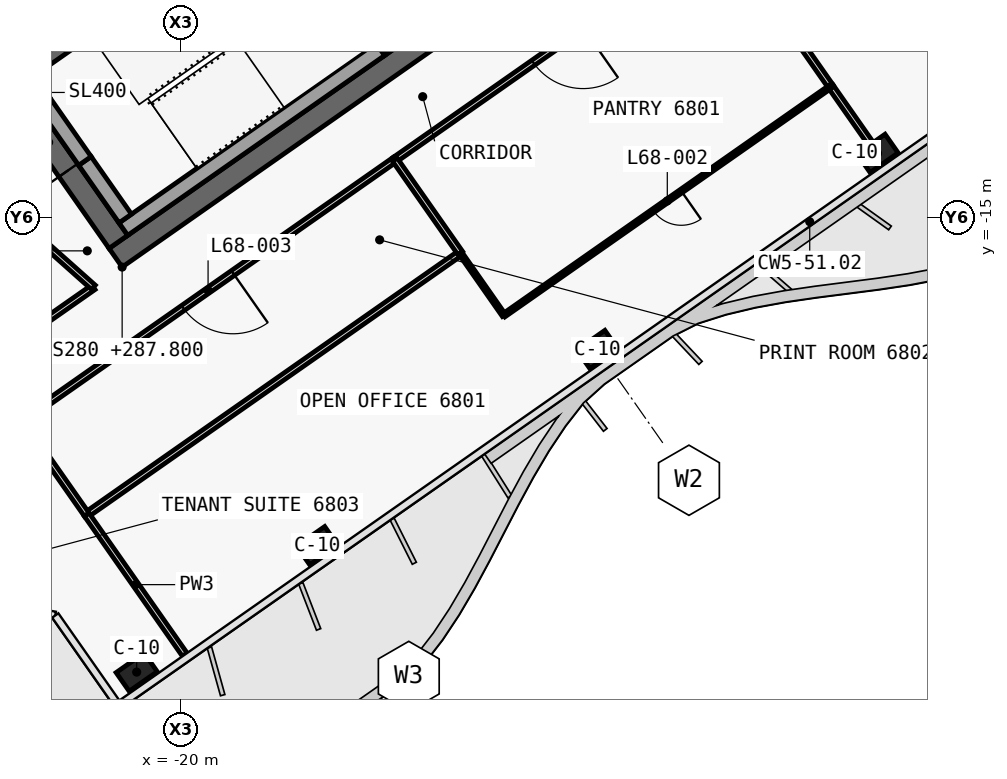
"""IFC4 building model, lengths in metres.
Left out: names, types, materials, properties, quantities, classifications, styles, units other than length and angle.
Written with IfcOpenShell. Run it as: python <this file> out.ifc"""

import sys

from ifc_helpers import new_model, si_unit, direction, frame, frame_2d, origin, origin_2d, place, context, subcontext, project, spatial, polyline, rectangle, outline, extrude, element, fill, save


model = new_model("IFC4")
c1 = context("Model", 3, precision=1e-05, world=origin(), true_north=direction((0.0, 1.0)))
c2 = subcontext(c1, "Body", "Model", "MODEL_VIEW")
j1 = project(units=[si_unit("LENGTHUNIT", "METRE"), si_unit("PLANEANGLEUNIT", "RADIAN")], contexts=[c1])
p1 = place(None, origin())
s1 = spatial("IfcSite", under=j1, at=p1, CompositionType="ELEMENT")
p2 = place(p1, origin())
s2 = spatial("IfcBuilding", under=s1, at=p2, CompositionType="ELEMENT")
p3 = place(p2, frame((0.0, 0.0, 287.8)))
s3 = spatial("IfcBuildingStorey", under=s2, at=p3, CompositionType="ELEMENT", Elevation=287.8)
p4 = place(p3, frame((-0.028, -0.874, 0.0), z_axis=(0.0, 0.0, 1.0), x_axis=(-0.819150035022, -0.573579305871, 0.0)))
e1 = element("IfcWall", 1, at=p4, inside=s3, PredefinedType="SHEAR", context=c2, shape_type="SweptSolid", body=[
    extrude(outline(polyline([(26.476, 0.3), (0.42, 0.3), (0.0, -0.3), (26.476, -0.3), (26.476, 0.3)])), origin(), (0.0, 0.0, 1.0), 3.9),
])
p5 = place(p4, frame((2.976, 0.0, 0.0)))
e2 = element("IfcOpeningElement", 2, at=p5, cuts=e1, PredefinedType="OPENING", context=c2, shape_type="SweptSolid", body=[
    extrude(rectangle(XDim=2.4, YDim=2.1, at=frame_2d((1.2, 1.05))), frame((0.0, 0.31, 0.0), z_axis=(0.0, -1.0, 0.0), x_axis=(1.0, 0.0, 0.0)), (0.0, 0.0, 1.0), 0.62),
])
p6 = place(p4, frame((11.776, 0.0, 0.0)))
e3 = element("IfcOpeningElement", 3, at=p6, cuts=e1, PredefinedType="OPENING", context=c2, shape_type="SweptSolid", body=[
    extrude(rectangle(XDim=2.4, YDim=2.1, at=frame_2d((1.2, 1.05))), frame((0.0, 0.31, 0.0), z_axis=(0.0, -1.0, 0.0), x_axis=(1.0, 0.0, 0.0)), (0.0, 0.0, 1.0), 0.62),
])
p7 = place(p3, frame((-21.642, -15.642, 0.0), z_axis=(0.0, 0.0, 1.0), x_axis=(-0.573586866468, 0.819144740944, 0.0)))
e4 = element("IfcWall", 4, at=p7, inside=s3, PredefinedType="SHEAR", context=c2, shape_type="SweptSolid", body=[
    extrude(outline(polyline([(0.0, 0.3), (0.0, -0.3), (10.0, -0.3), (10.0, 0.3), (0.0, 0.3)])), origin(), (0.0, 0.0, 1.0), 3.9),
])
p8 = place(p7, frame((6.5, 0.0, 0.0)))
e5 = element("IfcOpeningElement", 5, at=p8, cuts=e4, PredefinedType="OPENING", context=c2, shape_type="SweptSolid", body=[
    extrude(rectangle(XDim=1.8, YDim=2.1, at=frame_2d((0.9, 1.05))), frame((0.0, 0.31, 0.0), z_axis=(0.0, -1.0, 0.0), x_axis=(1.0, 0.0, 0.0)), (0.0, 0.0, 1.0), 0.62),
])
p9 = place(p7, frame((2.3, 0.0, 0.0)))
e6 = element("IfcOpeningElement", 6, at=p9, cuts=e4, PredefinedType="OPENING", context=c2, shape_type="SweptSolid", body=[
    extrude(rectangle(XDim=1.8, YDim=2.1, at=frame_2d((0.9, 1.05))), frame((0.0, 0.31, 0.0), z_axis=(0.0, -1.0, 0.0), x_axis=(1.0, 0.0, 0.0)), (0.0, 0.0, 1.0), 0.62),
])
p10 = place(p3, frame((-14.515, -10.652, 0.0), z_axis=(0.0, 0.0, 1.0), x_axis=(-0.573560315113, 0.819163332265, 0.0)))
e7 = element("IfcWall", 7, at=p10, inside=s3, PredefinedType="SHEAR", context=c2, shape_type="SweptSolid", body=[
    extrude(outline(polyline([(4.85, 0.15), (0.0, 0.15), (0.0, -0.15), (4.85, -0.15), (4.85, 0.15)])), origin(), (0.0, 0.0, 1.0), 3.9),
])
p11 = place(p3, frame((-2.638, 3.768, 0.0), z_axis=(0.0, 0.0, 1.0), x_axis=(-0.819155014212, -0.573572194837, 0.0)))
e8 = element("IfcWall", 8, at=p11, inside=s3, PredefinedType="SHEAR", context=c2, shape_type="SweptSolid", body=[
    extrude(outline(polyline([(26.4, 0.15), (0.0, 0.15), (0.0, -0.15), (26.4, -0.15), (26.4, 0.15)])), origin(), (0.0, 0.0, 1.0), 3.9),
])
p12 = place(p11, frame((1.169, 0.0, 0.0)))
e9 = element("IfcOpeningElement", 9, at=p12, cuts=e8, PredefinedType="OPENING", context=c2, shape_type="SweptSolid", body=[
    extrude(rectangle(XDim=1.1, YDim=2.1, at=frame_2d((0.55, 1.05))), frame((0.0, 0.16, 0.0), z_axis=(0.0, -1.0, 0.0), x_axis=(1.0, 0.0, 0.0)), (0.0, 0.0, 1.0), 0.32),
])
p13 = place(p11, frame((3.206, 0.0, 0.0)))
e10 = element("IfcOpeningElement", 10, at=p13, cuts=e8, PredefinedType="OPENING", context=c2, shape_type="SweptSolid", body=[
    extrude(rectangle(XDim=1.1, YDim=2.1, at=frame_2d((0.55, 1.05))), frame((0.0, 0.16, 0.0), z_axis=(0.0, -1.0, 0.0), x_axis=(1.0, 0.0, 0.0)), (0.0, 0.0, 1.0), 0.32),
])
p14 = place(p11, frame((5.244, 0.0, 0.0)))
e11 = element("IfcOpeningElement", 11, at=p14, cuts=e8, PredefinedType="OPENING", context=c2, shape_type="SweptSolid", body=[
    extrude(rectangle(XDim=1.1, YDim=2.1, at=frame_2d((0.55, 1.05))), frame((0.0, 0.16, 0.0), z_axis=(0.0, -1.0, 0.0), x_axis=(1.0, 0.0, 0.0)), (0.0, 0.0, 1.0), 0.32),
])
p15 = place(p11, frame((7.281, 0.0, 0.0)))
e12 = element("IfcOpeningElement", 12, at=p15, cuts=e8, PredefinedType="OPENING", context=c2, shape_type="SweptSolid", body=[
    extrude(rectangle(XDim=1.1, YDim=2.1, at=frame_2d((0.55, 1.05))), frame((0.0, 0.16, 0.0), z_axis=(0.0, -1.0, 0.0), x_axis=(1.0, 0.0, 0.0)), (0.0, 0.0, 1.0), 0.32),
])
p16 = place(p11, frame((9.688, 0.0, 0.0)))
e13 = element("IfcOpeningElement", 13, at=p16, cuts=e8, PredefinedType="OPENING", context=c2, shape_type="SweptSolid", body=[
    extrude(rectangle(XDim=1.1, YDim=2.1, at=frame_2d((0.55, 1.05))), frame((0.0, 0.16, 0.0), z_axis=(0.0, -1.0, 0.0), x_axis=(1.0, 0.0, 0.0)), (0.0, 0.0, 1.0), 0.32),
])
p17 = place(p11, frame((11.863, 0.0, 0.0)))
e14 = element("IfcOpeningElement", 14, at=p17, cuts=e8, PredefinedType="OPENING", context=c2, shape_type="SweptSolid", body=[
    extrude(rectangle(XDim=1.1, YDim=2.1, at=frame_2d((0.55, 1.05))), frame((0.0, 0.16, 0.0), z_axis=(0.0, -1.0, 0.0), x_axis=(1.0, 0.0, 0.0)), (0.0, 0.0, 1.0), 0.32),
])
p18 = place(p11, frame((13.722, 0.0, 0.0)))
e15 = element("IfcOpeningElement", 15, at=p18, cuts=e8, PredefinedType="OPENING", context=c2, shape_type="SweptSolid", body=[
    extrude(rectangle(XDim=1.0, YDim=2.1, at=frame_2d((0.5, 1.05))), frame((0.0, 0.16, 0.0), z_axis=(0.0, -1.0, 0.0), x_axis=(1.0, 0.0, 0.0)), (0.0, 0.0, 1.0), 0.32),
])
p19 = place(p11, frame((15.798, 0.0, 0.0)))
e16 = element("IfcOpeningElement", 16, at=p19, cuts=e8, PredefinedType="OPENING", context=c2, shape_type="SweptSolid", body=[
    extrude(rectangle(XDim=1.0, YDim=2.1, at=frame_2d((0.5, 1.05))), frame((0.0, 0.16, 0.0), z_axis=(0.0, -1.0, 0.0), x_axis=(1.0, 0.0, 0.0)), (0.0, 0.0, 1.0), 0.32),
])
for number, where, z_axis, x_axis in (
    (17, (-1.665, -13.313, 0.0), (0.0, 0.0, 1.0), (-0.819, -0.574, 0.0)),
    (18, (-9.038, -18.475, 0.0), (0.0, 0.0, 1.0), (-0.819, -0.574, 0.0)),
    (19, (-16.41, -23.637, 0.0), (0.0, 0.0, 1.0), (-0.819, -0.574, 0.0)),
    (20, (-21.161, -26.964, 0.0), (0.0, 0.0, 1.0), (-0.819, -0.574, 0.0)),
):
    element("IfcColumn", number, at=place(p3, frame(where, z_axis=z_axis, x_axis=x_axis)), inside=s3, PredefinedType="COLUMN", context=c2, shape_type="SweptSolid", body=[
        extrude(rectangle(XDim=0.9, YDim=0.6, at=origin_2d()), origin(), (0.0, 0.0, 1.0), 3.9),
    ])
p20 = place(p3, frame((-14.753, -10.574, 0.0), z_axis=(0.0, 0.0, 1.0), x_axis=(-0.819158229677, -0.573567602601, 0.0)))
e21 = element("IfcWall", 21, at=p20, inside=s3, PredefinedType="SOLIDWALL", context=c2, shape_type="SweptSolid", body=[
    extrude(rectangle(XDim=8.25, YDim=0.4, at=frame_2d((4.125, 0.0))), origin(), (0.0, 0.0, 1.0), 3.62),
])
p21 = place(p3, frame((-21.462, -15.028, 0.0), z_axis=(0.0, 0.0, 1.0), x_axis=(-0.573559770908, 0.819163713305, 0.0)))
e22 = element("IfcWall", 22, at=p21, inside=s3, PredefinedType="SOLIDWALL", context=c2, shape_type="SweptSolid", body=[
    extrude(rectangle(XDim=1.85, YDim=0.4, at=frame_2d((0.925, 0.0))), origin(), (0.0, 0.0, 1.0), 3.62),
])
p22 = place(p3, frame((-22.523, -13.512, 2.15), z_axis=(0.0, 0.0, 1.0), x_axis=(-0.573591692345, 0.819141361715, 0.0)))
e23 = element("IfcWall", 23, at=p22, inside=s3, PredefinedType="SOLIDWALL", context=c2, shape_type="SweptSolid", body=[
    extrude(rectangle(XDim=1.9, YDim=0.4, at=frame_2d((0.95, 0.0))), origin(), (0.0, 0.0, 1.0), 1.47),
])
p23 = place(p3, frame((-26.459, -19.749, 0.0), z_axis=(0.0, 0.0, 1.0), x_axis=(0.819141574295, 0.573591388761, 0.0)))
e24 = element("IfcWall", 24, at=p23, inside=s3, PredefinedType="PARTITIONING", context=c2, shape_type="SweptSolid", body=[
    extrude(rectangle(XDim=5.079, YDim=0.15, at=frame_2d((2.539, 0.0))), origin(), (0.0, 0.0, 1.0), 3.05),
])
p24 = place(p23, frame((1.74, 0.0, 0.0)))
e25 = element("IfcOpeningElement", 25, at=p24, cuts=e24, PredefinedType="OPENING", context=c2, shape_type="SweptSolid", body=[
    extrude(rectangle(XDim=1.6, YDim=2.1, at=frame_2d((0.8, 1.05))), frame((0.0, 0.085, 0.0), z_axis=(0.0, -1.0, 0.0), x_axis=(1.0, 0.0, 0.0)), (0.0, 0.0, 1.0), 0.17),
])
p25 = place(p3, frame((-5.766, -7.456, 0.0), z_axis=(0.0, 0.0, 1.0), x_axis=(-0.819154371039, -0.573573113393, 0.0)))
e26 = element("IfcWall", 26, at=p25, inside=s3, PredefinedType="PARTITIONING", context=c2, shape_type="SweptSolid", body=[
    extrude(rectangle(XDim=10.502, YDim=0.15, at=frame_2d((5.251, 0.0))), origin(), (0.0, 0.0, 1.0), 3.05),
])
p26 = place(p25, frame((4.451, 0.0, 0.0)))
e27 = element("IfcOpeningElement", 27, at=p26, cuts=e26, PredefinedType="OPENING", context=c2, shape_type="SweptSolid", body=[
    extrude(rectangle(XDim=1.6, YDim=2.1, at=frame_2d((0.8, 1.05))), frame((0.0, 0.085, 0.0), z_axis=(0.0, -1.0, 0.0), x_axis=(1.0, 0.0, 0.0)), (0.0, 0.0, 1.0), 0.17),
])
p27 = place(p3, frame((-14.366, -13.477, 0.0), z_axis=(0.0, 0.0, 1.0), x_axis=(-0.819164075089, -0.573559254204, 0.0)))
e28 = element("IfcWall", 28, at=p27, inside=s3, PredefinedType="PARTITIONING", context=c2, shape_type="SweptSolid", body=[
    extrude(rectangle(XDim=12.004, YDim=0.15, at=frame_2d((6.002, 0.0))), origin(), (0.0, 0.0, 1.0), 3.05),
])
p28 = place(p27, frame((5.202, 0.0, 0.0)))
e29 = element("IfcOpeningElement", 29, at=p28, cuts=e28, PredefinedType="OPENING", context=c2, shape_type="SweptSolid", body=[
    extrude(rectangle(XDim=1.6, YDim=2.1, at=frame_2d((0.8, 1.05))), frame((0.0, 0.085, 0.0), z_axis=(0.0, -1.0, 0.0), x_axis=(1.0, 0.0, 0.0)), (0.0, 0.0, 1.0), 0.17),
])
p29 = place(p3, frame((-1.849, -13.051, 0.0), z_axis=(0.0, 0.0, 1.0), x_axis=(-0.573542889209, 0.819175533227, 0.0)))
e30 = element("IfcWall", 30, at=p29, inside=s3, PredefinedType="PARTITIONING", context=c2, shape_type="SweptSolid", body=[
    extrude(rectangle(XDim=1.831, YDim=0.15, at=frame_2d((0.916, 0.0))), origin(), (0.0, 0.0, 1.0), 3.05),
])
p30 = place(p3, frame((-2.897, -11.553, 0.0), z_axis=(0.0, 0.0, 1.0), x_axis=(-0.573593309886, 0.819140229054, 0.0)))
e31 = element("IfcWall", 31, at=p30, inside=s3, PredefinedType="PARTITIONING", context=c2, shape_type="SweptSolid", body=[
    extrude(rectangle(XDim=5.004, YDim=0.15, at=frame_2d((2.502, 0.0))), origin(), (0.0, 0.0, 1.0), 3.05),
])
p31 = place(p3, frame((-22.3, -16.837, 0.0), z_axis=(0.0, 0.0, 1.0), x_axis=(-0.746942190663, 0.664888986078, 0.0)))
e32 = element("IfcWall", 32, at=p31, inside=s3, PredefinedType="PARTITIONING", context=c2, shape_type="SweptSolid", body=[
    extrude(rectangle(XDim=2.365, YDim=0.15, at=frame_2d((1.183, 0.0))), origin(), (0.0, 0.0, 1.0), 3.62),
])
p32 = place(p3, frame((-11.499, -17.575, 0.0), z_axis=(0.0, 0.0, 1.0), x_axis=(-0.573486922046, 0.819214715592, 0.0)))
e33 = element("IfcWall", 33, at=p32, inside=s3, PredefinedType="PARTITIONING", context=c2, shape_type="SweptSolid", body=[
    extrude(rectangle(XDim=2.0, YDim=0.1, at=frame_2d((1.0, 0.0))), origin(), (0.0, 0.0, 1.0), 3.62),
])
p33 = place(p3, frame((-2.898, -11.552, 0.0), z_axis=(0.0, 0.0, 1.0), x_axis=(-0.819155448096, -0.573571575181, 0.0)))
e34 = element("IfcWall", 34, at=p33, inside=s3, PredefinedType="PARTITIONING", context=c2, shape_type="SweptSolid", body=[
    extrude(rectangle(XDim=10.5, YDim=0.1, at=frame_2d((5.25, 0.0))), origin(), (0.0, 0.0, 1.0), 3.05),
])
p34 = place(p33, frame((4.8, 0.0, 0.0)))
e35 = element("IfcOpeningElement", 35, at=p34, cuts=e34, PredefinedType="OPENING", context=c2, shape_type="SweptSolid", body=[
    extrude(rectangle(XDim=0.9, YDim=2.1, at=frame_2d((0.45, 1.05))), frame((0.0, 0.06, 0.0), z_axis=(0.0, -1.0, 0.0), x_axis=(1.0, 0.0, 0.0)), (0.0, 0.0, 1.0), 0.12),
])
p35 = place(p3, frame((-22.476, -22.82, 0.0), z_axis=(0.0, 0.0, 1.0), x_axis=(0.819153538506, 0.573574302382, 0.0)))
e36 = element("IfcWall", 36, at=p35, inside=s3, PredefinedType="PARTITIONING", context=c2, shape_type="SweptSolid", body=[
    extrude(rectangle(XDim=12.0, YDim=0.15, at=frame_2d((6.0, 0.0))), origin(), (0.0, 0.0, 1.0), 3.05),
])
p36 = place(p3, frame((-19.896, -26.505, 0.0), z_axis=(0.0, 0.0, 1.0), x_axis=(-0.573589807488, 0.819142681555, 0.0)))
e37 = element("IfcWall", 37, at=p36, inside=s3, PredefinedType="PARTITIONING", context=c2, shape_type="SweptSolid", body=[
    extrude(rectangle(XDim=4.499, YDim=0.15, at=frame_2d((2.25, 0.0))), origin(), (0.0, 0.0, 1.0), 3.0),
])
p37 = place(p3, frame((-12.646, -15.938, 0.0), z_axis=(0.0, 0.0, 1.0), x_axis=(-0.573604249862, 0.819132568355, 0.0)))
e38 = element("IfcWall", 38, at=p37, inside=s3, PredefinedType="PARTITIONING", context=c2, shape_type="SweptSolid", body=[
    extrude(rectangle(XDim=3.002, YDim=0.15, at=frame_2d((1.501, 0.0))), origin(), (0.0, 0.0, 1.0), 3.62),
])
p38 = place(p3, frame((-22.477, -22.819, 0.0), z_axis=(0.0, 0.0, 1.0), x_axis=(-0.573598887793, 0.819136323161, 0.0)))
e39 = element("IfcWall", 39, at=p38, inside=s3, PredefinedType="PARTITIONING", context=c2, shape_type="SweptSolid", body=[
    extrude(rectangle(XDim=3.0, YDim=0.15, at=frame_2d((1.5, 0.0))), origin(), (0.0, 0.0, 1.0), 3.62),
])
p39 = place(p9, origin())
e40 = element("IfcDoor", 40, at=p39, inside=s3, OperationType="DOUBLE_DOOR_SINGLE_SWING", PredefinedType="DOOR", context=c2, shape_type="SweptSolid", body=[
    extrude(rectangle(XDim=1.8, YDim=2.1, at=frame_2d((0.9, 1.05))), frame((0.0, 0.025, 0.0), z_axis=(0.0, -1.0, 0.0), x_axis=(1.0, 0.0, 0.0)), (0.0, 0.0, 1.0), 0.05),
])
fill(e6, e40)
p40 = place(p26, origin())
e41 = element("IfcDoor", 41, at=p40, inside=s3, OperationType="DOUBLE_DOOR_SINGLE_SWING", PredefinedType="DOOR", context=c2, shape_type="SweptSolid", body=[
    extrude(rectangle(XDim=1.6, YDim=2.1, at=frame_2d((0.8, 1.05))), frame((0.0, 0.025, 0.0), z_axis=(0.0, -1.0, 0.0), x_axis=(1.0, 0.0, 0.0)), (0.0, 0.0, 1.0), 0.05),
])
fill(e27, e41)
p41 = place(p34, origin())
e42 = element("IfcDoor", 42, at=p41, inside=s3, OperationType="SINGLE_SWING_LEFT", PredefinedType="DOOR", context=c2, shape_type="SweptSolid", body=[
    extrude(rectangle(XDim=0.9, YDim=2.1, at=frame_2d((0.45, 1.05))), frame((0.0, 0.025, 0.0), z_axis=(0.0, -1.0, 0.0), x_axis=(1.0, 0.0, 0.0)), (0.0, 0.0, 1.0), 0.05),
])
fill(e35, e42)
p42 = place(p28, origin())
e43 = element("IfcDoor", 43, at=p42, inside=s3, OperationType="DOUBLE_DOOR_SINGLE_SWING", PredefinedType="DOOR", context=c2, shape_type="SweptSolid", body=[
    extrude(rectangle(XDim=1.6, YDim=2.1, at=frame_2d((0.8, 1.05))), frame((0.0, 0.025, 0.0), z_axis=(0.0, -1.0, 0.0), x_axis=(1.0, 0.0, 0.0)), (0.0, 0.0, 1.0), 0.05),
])
fill(e29, e43)
save(model, sys.argv[1])
